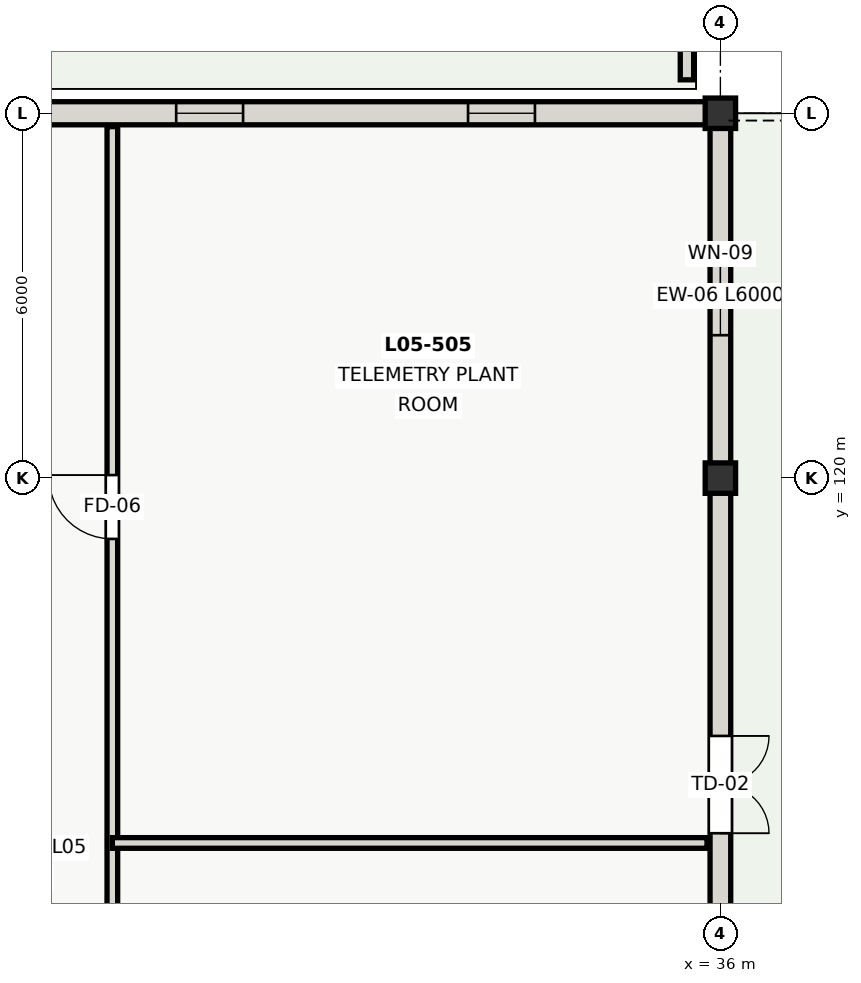
"""IFC4 building model, lengths in metres.
Left out: names, types, materials, properties, quantities, classifications, styles, units other than length and angle.
Written with IfcOpenShell. Run it as: python <this file> out.ifc"""

import sys

from ifc_helpers import new_model, si_unit, direction, frame, frame_2d, origin, origin_2d, place, context, subcontext, project, spatial, rectangle, extrude, element, fill, save


model = new_model("IFC4")
c1 = context("Model", 3, precision=1e-05, world=origin(), true_north=direction((0.0, 1.0)))
c2 = subcontext(c1, "Body", "Model", "MODEL_VIEW")
j1 = project(units=[si_unit("LENGTHUNIT", "METRE"), si_unit("PLANEANGLEUNIT", "RADIAN")], contexts=[c1])
p1 = place(None, origin())
s1 = spatial("IfcSite", under=j1, at=p1, CompositionType="ELEMENT")
p2 = place(p1, origin())
s2 = spatial("IfcBuilding", under=s1, at=p2, CompositionType="ELEMENT")
p3 = place(p2, frame((0.0, 0.0, 16.8)))
s3 = spatial("IfcBuildingStorey", under=s2, at=p3, CompositionType="ELEMENT", Elevation=16.8)
for number, where, z_axis, x_axis in (
    (1, (36.0, 120.0, 0.0), (0.0, 0.0, 1.0), (1.0, 0.0, 0.0)),
    (2, (36.0, 126.0, 0.0), (0.0, 0.0, 1.0), (1.0, 0.0, 0.0)),
):
    element("IfcColumn", number, at=place(p3, frame(where, z_axis=z_axis, x_axis=x_axis)), inside=s3, PredefinedType="COLUMN", context=c2, shape_type="SweptSolid", body=[
        extrude(rectangle(XDim=0.5, YDim=0.5, at=origin_2d()), origin(), (0.0, 0.0, 1.0), 4.2),
    ])
p4 = place(p3, frame((36.0, 120.0, 0.0), z_axis=(0.0, 0.0, 1.0), x_axis=(0.0, -1.0, 0.0)))
e3 = element("IfcWall", 3, at=p4, inside=s3, PredefinedType="SOLIDWALL", context=c2, shape_type="SweptSolid", body=[
    extrude(rectangle(XDim=18.0, YDim=0.34, at=frame_2d((9.0, 0.0))), origin(), (0.0, 0.0, 1.0), 3.525),
])
p5 = place(p4, frame((4.24, 0.0, 0.0)))
e4 = element("IfcOpeningElement", 4, at=p5, cuts=e3, PredefinedType="OPENING", context=c2, shape_type="SweptSolid", body=[
    extrude(rectangle(XDim=1.6, YDim=2.15, at=frame_2d((0.8, 1.075))), frame((0.0, 0.18, 0.0), z_axis=(0.0, -1.0, 0.0), x_axis=(1.0, 0.0, 0.0)), (0.0, 0.0, 1.0), 0.36),
])
p6 = place(p4, frame((12.16, 0.0, 0.0)))
e5 = element("IfcOpeningElement", 5, at=p6, cuts=e3, PredefinedType="OPENING", context=c2, shape_type="SweptSolid", body=[
    extrude(rectangle(XDim=1.6, YDim=2.15, at=frame_2d((0.8, 1.075))), frame((0.0, 0.18, 0.0), z_axis=(0.0, -1.0, 0.0), x_axis=(1.0, 0.0, 0.0)), (0.0, 0.0, 1.0), 0.36),
])
p7 = place(p3, frame((36.0, 126.0, 0.0), z_axis=(0.0, 0.0, 1.0), x_axis=(0.0, -1.0, 0.0)))
e6 = element("IfcWall", 6, at=p7, inside=s3, PredefinedType="SOLIDWALL", context=c2, shape_type="SweptSolid", body=[
    extrude(rectangle(XDim=6.0, YDim=0.34, at=frame_2d((3.0, 0.0))), origin(), (0.0, 0.0, 1.0), 3.525),
])
p8 = place(p7, frame((2.35, 0.0, 0.9)))
e7 = element("IfcOpeningElement", 7, at=p8, cuts=e6, PredefinedType="OPENING", context=c2, shape_type="SweptSolid", body=[
    extrude(rectangle(XDim=1.3, YDim=1.7, at=frame_2d((0.65, 0.85))), frame((0.0, 0.18, 0.0), z_axis=(0.0, -1.0, 0.0), x_axis=(1.0, 0.0, 0.0)), (0.0, 0.0, 1.0), 0.36),
])
p9 = place(p3, frame((24.0, 126.0, 0.0), z_axis=(0.0, 0.0, 1.0), x_axis=(1.0, 0.0, 0.0)))
e8 = element("IfcWall", 8, at=p9, inside=s3, PredefinedType="SOLIDWALL", context=c2, shape_type="SweptSolid", body=[
    extrude(rectangle(XDim=12.0, YDim=0.38, at=frame_2d((6.0, 0.0))), origin(), (0.0, 0.0, 1.0), 3.555),
])
p10 = place(p9, frame((3.05, 0.0, 0.9)))
e9 = element("IfcOpeningElement", 9, at=p10, cuts=e8, PredefinedType="OPENING", context=c2, shape_type="SweptSolid", body=[
    extrude(rectangle(XDim=1.1, YDim=1.55, at=frame_2d((0.55, 0.775))), frame((0.0, 0.2, 0.0), z_axis=(0.0, -1.0, 0.0), x_axis=(1.0, 0.0, 0.0)), (0.0, 0.0, 1.0), 0.4),
])
p11 = place(p9, frame((7.85, 0.0, 0.9)))
e10 = element("IfcOpeningElement", 10, at=p11, cuts=e8, PredefinedType="OPENING", context=c2, shape_type="SweptSolid", body=[
    extrude(rectangle(XDim=1.1, YDim=1.55, at=frame_2d((0.55, 0.775))), frame((0.0, 0.2, 0.0), z_axis=(0.0, -1.0, 0.0), x_axis=(1.0, 0.0, 0.0)), (0.0, 0.0, 1.0), 0.4),
])
p12 = place(p3, frame((35.45, 137.85, 0.0), z_axis=(0.0, 0.0, 1.0), x_axis=(0.0, -1.0, 0.0)))
e11 = element("IfcWall", 11, at=p12, inside=s3, PredefinedType="PARAPET", context=c2, shape_type="SweptSolid", body=[
    extrude(rectangle(XDim=11.3, YDim=0.22, at=frame_2d((5.65, 0.0))), origin(), (0.0, 0.0, 1.0), 1.15),
])
p13 = place(p3, frame((26.0, 84.22, 0.0), z_axis=(0.0, 0.0, 1.0), x_axis=(0.0, 1.0, 0.0)))
e12 = element("IfcWall", 12, at=p13, inside=s3, PredefinedType="PARTITIONING", context=c2, shape_type="SweptSolid", body=[
    extrude(rectangle(XDim=41.56, YDim=0.175, at=frame_2d((20.78, 0.0))), origin(), (0.0, 0.0, 1.0), 3.8),
])
p14 = place(p13, frame((7.78, 0.0, 0.0)))
e13 = element("IfcOpeningElement", 13, at=p14, cuts=e12, PredefinedType="OPENING", context=c2, shape_type="SweptSolid", body=[
    extrude(rectangle(XDim=0.98, YDim=2.1, at=frame_2d((0.49, 1.05))), frame((0.0, 0.097, 0.0), z_axis=(0.0, -1.0, 0.0), x_axis=(1.0, 0.0, 0.0)), (0.0, 0.0, 1.0), 0.195),
])
p15 = place(p13, frame((24.78, 0.0, 0.0)))
e14 = element("IfcOpeningElement", 14, at=p15, cuts=e12, PredefinedType="OPENING", context=c2, shape_type="SweptSolid", body=[
    extrude(rectangle(XDim=0.92, YDim=2.05, at=frame_2d((0.46, 1.025))), frame((0.0, 0.097, 0.0), z_axis=(0.0, -1.0, 0.0), x_axis=(1.0, 0.0, 0.0)), (0.0, 0.0, 1.0), 0.195),
])
p16 = place(p13, frame((34.78, 0.0, 0.0)))
e15 = element("IfcOpeningElement", 15, at=p16, cuts=e12, PredefinedType="OPENING", context=c2, shape_type="SweptSolid", body=[
    extrude(rectangle(XDim=1.05, YDim=2.1, at=frame_2d((0.525, 1.05))), frame((0.0, 0.097, 0.0), z_axis=(0.0, -1.0, 0.0), x_axis=(1.0, 0.0, 0.0)), (0.0, 0.0, 1.0), 0.195),
])
p17 = place(p3, frame((26.0, 114.0, 0.0), z_axis=(0.0, 0.0, 1.0), x_axis=(1.0, 0.0, 0.0)))
e16 = element("IfcWall", 16, at=p17, inside=s3, PredefinedType="PARTITIONING", context=c2, shape_type="SweptSolid", body=[
    extrude(rectangle(XDim=9.78, YDim=0.175, at=frame_2d((4.89, 0.0))), origin(), (0.0, 0.0, 1.0), 3.8),
])
p18 = place(p5, origin())
e17 = element("IfcDoor", 17, at=p18, inside=s3, OperationType="DOUBLE_DOOR_SINGLE_SWING", PredefinedType="DOOR", context=c2, shape_type="SweptSolid", body=[
    extrude(rectangle(XDim=1.6, YDim=2.15, at=frame_2d((0.8, 1.075))), frame((0.0, 0.025, 0.0), z_axis=(0.0, -1.0, 0.0), x_axis=(1.0, 0.0, 0.0)), (0.0, 0.0, 1.0), 0.05),
])
fill(e4, e17)
p19 = place(p8, origin())
e18 = element("IfcWindow", 18, at=p19, inside=s3, PartitioningType="SINGLE_PANEL", PredefinedType="WINDOW", context=c2, shape_type="SweptSolid", body=[
    extrude(rectangle(XDim=1.3, YDim=1.7, at=frame_2d((0.65, 0.85))), frame((0.0, 0.03, 0.0), z_axis=(0.0, -1.0, 0.0), x_axis=(1.0, 0.0, 0.0)), (0.0, 0.0, 1.0), 0.06),
])
fill(e7, e18)
p20 = place(p10, origin())
e19 = element("IfcWindow", 19, at=p20, inside=s3, PartitioningType="SINGLE_PANEL", PredefinedType="WINDOW", context=c2, shape_type="SweptSolid", body=[
    extrude(rectangle(XDim=1.1, YDim=1.55, at=frame_2d((0.55, 0.775))), frame((0.0, 0.03, 0.0), z_axis=(0.0, -1.0, 0.0), x_axis=(1.0, 0.0, 0.0)), (0.0, 0.0, 1.0), 0.06),
])
fill(e9, e19)
p21 = place(p11, origin())
e20 = element("IfcWindow", 20, at=p21, inside=s3, PartitioningType="SINGLE_PANEL", PredefinedType="WINDOW", context=c2, shape_type="SweptSolid", body=[
    extrude(rectangle(XDim=1.1, YDim=1.55, at=frame_2d((0.55, 0.775))), frame((0.0, 0.03, 0.0), z_axis=(0.0, -1.0, 0.0), x_axis=(1.0, 0.0, 0.0)), (0.0, 0.0, 1.0), 0.06),
])
fill(e10, e20)
p22 = place(p16, origin())
e21 = element("IfcDoor", 21, at=p22, inside=s3, OperationType="SINGLE_SWING_RIGHT", PredefinedType="DOOR", context=c2, shape_type="SweptSolid", body=[
    extrude(rectangle(XDim=1.05, YDim=2.1, at=frame_2d((0.525, 1.05))), frame((0.0, 0.025, 0.0), z_axis=(0.0, -1.0, 0.0), x_axis=(1.0, 0.0, 0.0)), (0.0, 0.0, 1.0), 0.05),
])
fill(e15, e21)
save(model, sys.argv[1])
